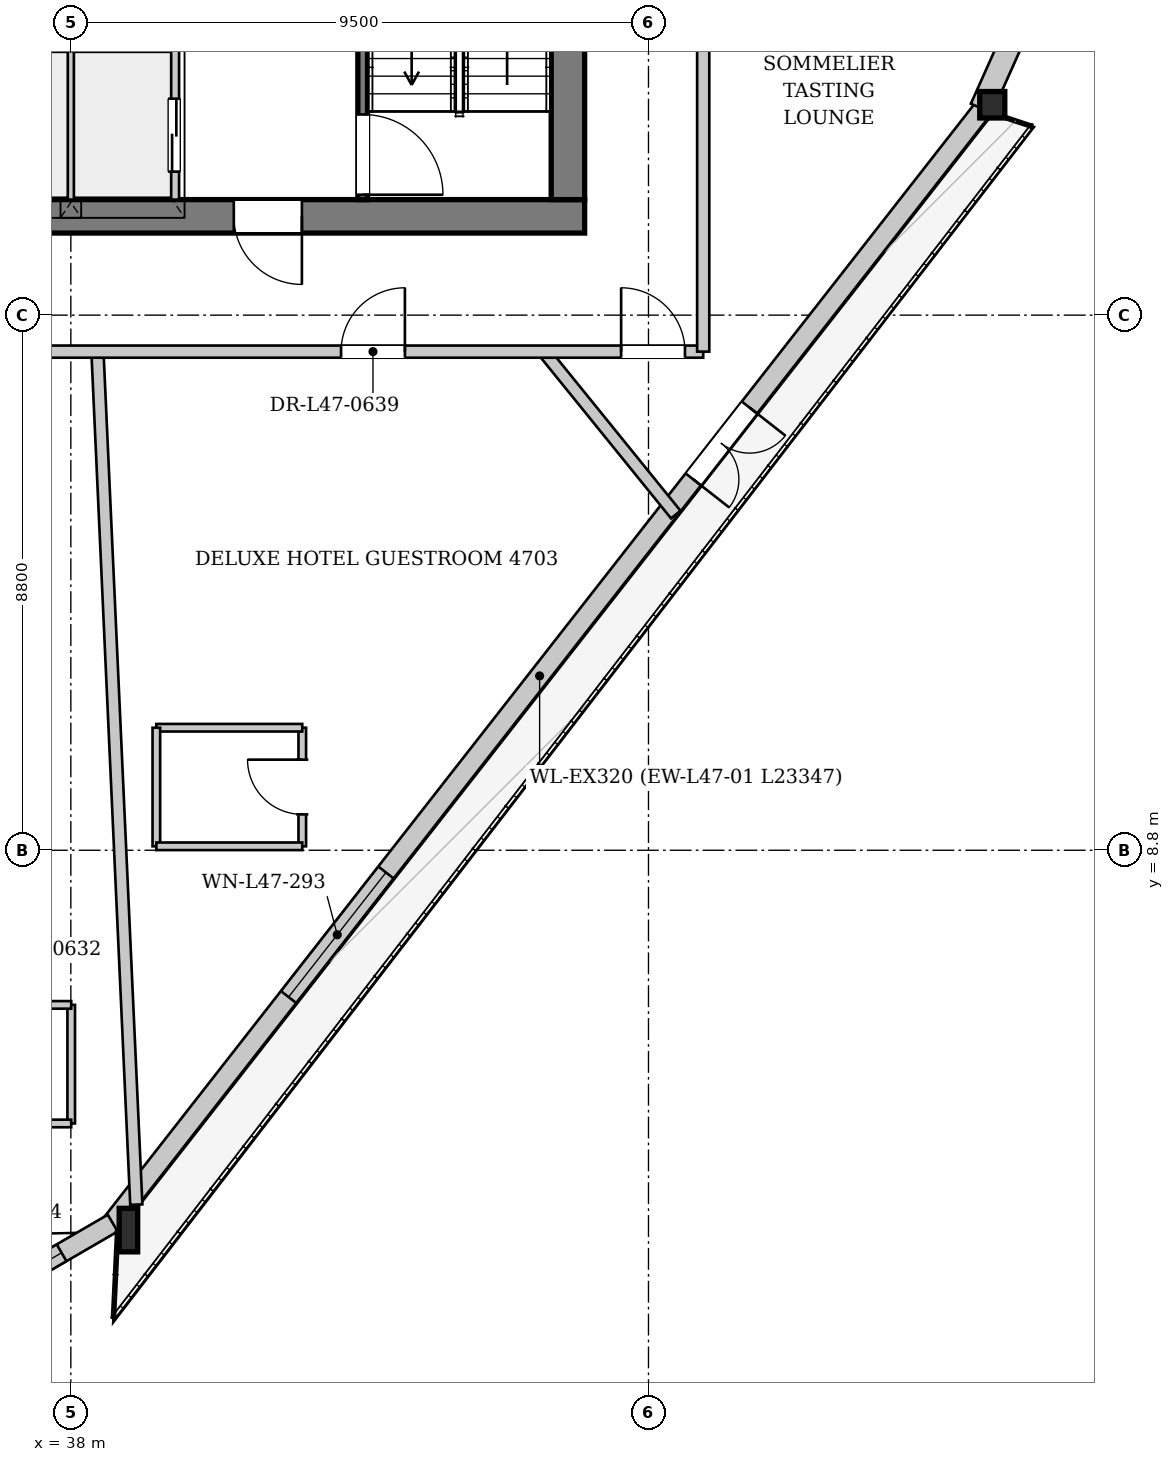
"""IFC4 building model, lengths in metres.
Left out: names, types, materials, properties, quantities, classifications, styles, units other than length and angle.
Written with IfcOpenShell. Run it as: python <this file> out.ifc"""

import sys

from ifc_helpers import new_model, si_unit, direction, frame, frame_2d, origin, origin_2d, place, context, subcontext, project, spatial, rectangle, i_section, extrude, source, transform, mapped, element, fill, save


model = new_model("IFC4")
c1 = context("Model", 3, precision=1e-05, world=origin(), true_north=direction((0.0, 1.0)))
c2 = subcontext(c1, "Body", "Model", "MODEL_VIEW")
j1 = project(units=[si_unit("LENGTHUNIT", "METRE"), si_unit("PLANEANGLEUNIT", "RADIAN")], contexts=[c1])
p1 = place(None, origin())
s1 = spatial("IfcSite", under=j1, at=p1, CompositionType="ELEMENT")
p2 = place(p1, origin())
s2 = spatial("IfcBuilding", under=s1, at=p2, CompositionType="ELEMENT")
p3 = place(p2, frame((0.0, 0.0, 178.55)))
s3 = spatial("IfcBuildingStorey", under=s2, at=p3, CompositionType="ELEMENT", Elevation=178.55)
m1 = source(origin(), c2, "Body", "SweptSolid", [
    extrude(i_section(OverallWidth=0.304, OverallDepth=0.716, WebThickness=0.021, FlangeThickness=0.04, at=origin_2d()), origin(), (0.0, 0.0, 1.0), 3.404),
])
p4 = place(p3, frame((38.769, 2.53, 0.0), z_axis=(0.104640945149, 0.013985595822, 0.994411723436), x_axis=(-0.132475210533, 0.991186318809, 0.0)))
e1 = element("IfcColumn", 1, at=p4, inside=s3, PredefinedType="COLUMN", context=c2, shape_type="MappedRepresentation", body=[
    mapped(m1, transform((0.0, 0.0, 0.0), x_axis=(1.0, 0.0, 0.0), y_axis=(0.0, 1.0, 0.0), z_axis=(0.0, 0.0, 1.0), scale=1.0)),
])
m2 = source(origin(), c2, "Body", "SweptSolid", [
    extrude(i_section(OverallWidth=0.412, OverallDepth=0.435, WebThickness=0.031, FlangeThickness=0.05, at=origin_2d()), origin(), (0.0, 0.0, 1.0), 3.396),
])
p5 = place(p3, frame((53.149, 20.923, 0.0), z_axis=(0.002803613193, 0.080873457504, 0.996720434036), x_axis=(-0.99939965217, 0.034645854609, 0.0)))
e2 = element("IfcColumn", 2, at=p5, inside=s3, PredefinedType="COLUMN", context=c2, shape_type="MappedRepresentation", body=[
    mapped(m2, transform((0.0, 0.0, 0.0), x_axis=(1.0, 0.0, 0.0), y_axis=(0.0, 1.0, 0.0), z_axis=(0.0, 0.0, 1.0), scale=1.0)),
])
p6 = place(p3, frame((53.023, 21.021, 0.0), z_axis=(0.0, 0.0, 1.0), x_axis=(-0.61594757216, -0.787787146601, 0.0)))
e3 = element("IfcWall", 3, at=p6, inside=s3, PredefinedType="SOLIDWALL", context=c2, shape_type="SweptSolid", body=[
    extrude(rectangle(XDim=23.347, YDim=0.32, at=frame_2d((11.674, 0.0))), origin(), (0.0, 0.0, 1.0), 2.722),
])
p7 = place(p6, frame((6.271, 0.0, 0.0)))
e4 = element("IfcOpeningElement", 4, at=p7, cuts=e3, PredefinedType="OPENING", context=c2, shape_type="SweptSolid", body=[
    extrude(rectangle(XDim=1.5, YDim=2.3, at=frame_2d((0.75, 1.15))), frame((0.0, 0.17, 0.0), z_axis=(0.0, -1.0, 0.0), x_axis=(1.0, 0.0, 0.0)), (0.0, 0.0, 1.0), 0.34),
])
p8 = place(p6, frame((15.977, 0.0, 0.252)))
e5 = element("IfcOpeningElement", 5, at=p8, cuts=e3, PredefinedType="OPENING", context=c2, shape_type="SweptSolid", body=[
    extrude(rectangle(XDim=2.6, YDim=2.35, at=frame_2d((1.3, 1.175))), frame((0.0, 0.17, 0.0), z_axis=(0.0, -1.0, 0.0), x_axis=(1.0, 0.0, 0.0)), (0.0, 0.0, 1.0), 0.34),
])
p9 = place(p3, frame((38.688, 2.668, 0.0), z_axis=(0.0, 0.0, 1.0), x_axis=(-0.864772067984, -0.502164585007, 0.0)))
e6 = element("IfcWall", 6, at=p9, inside=s3, PredefinedType="SOLIDWALL", context=c2, shape_type="SweptSolid", body=[
    extrude(rectangle(XDim=3.445, YDim=0.32, at=frame_2d((1.722, 0.0))), origin(), (0.0, 0.0, 1.0), 2.722),
])
p10 = place(p9, frame((0.972, 0.0, 0.302)))
e7 = element("IfcOpeningElement", 7, at=p10, cuts=e6, PredefinedType="OPENING", context=c2, shape_type="SweptSolid", body=[
    extrude(rectangle(XDim=1.5, YDim=2.3, at=frame_2d((0.75, 1.15))), frame((0.0, 0.17, 0.0), z_axis=(0.0, -1.0, 0.0), x_axis=(1.0, 0.0, 0.0)), (0.0, 0.0, 1.0), 0.34),
])
p11 = place(p3, frame((62.502, 42.315, 0.0), z_axis=(0.0, 0.0, 1.0), x_axis=(-0.408010166112, -0.912977384358, 0.0)))
e8 = element("IfcWall", 8, at=p11, inside=s3, PredefinedType="SOLIDWALL", context=c2, shape_type="SweptSolid", body=[
    extrude(rectangle(XDim=23.347, YDim=0.38, at=frame_2d((11.674, 0.0))), origin(), (0.0, 0.0, 1.0), 2.722),
])
p12 = place(p11, frame((4.337, 0.0, 0.352)))
e9 = element("IfcOpeningElement", 9, at=p12, cuts=e8, PredefinedType="OPENING", context=c2, shape_type="SweptSolid", body=[
    extrude(rectangle(XDim=2.2, YDim=2.25, at=frame_2d((1.1, 1.125))), frame((0.0, 0.2, 0.0), z_axis=(0.0, -1.0, 0.0), x_axis=(1.0, 0.0, 0.0)), (0.0, 0.0, 1.0), 0.4),
])
p13 = place(p11, frame((15.71, 0.0, 0.352)))
e10 = element("IfcOpeningElement", 10, at=p13, cuts=e8, PredefinedType="OPENING", context=c2, shape_type="SweptSolid", body=[
    extrude(rectangle(XDim=2.2, YDim=2.25, at=frame_2d((1.1, 1.125))), frame((0.0, 0.2, 0.0), z_axis=(0.0, -1.0, 0.0), x_axis=(1.0, 0.0, 0.0)), (0.0, 0.0, 1.0), 0.4),
])
p14 = place(p3, frame((46.45, 19.225, 0.0), z_axis=(0.0, 0.0, 1.0), x_axis=(-1.0, 0.0, 0.0)))
e11 = element("IfcWall", 11, at=p14, inside=s3, PredefinedType="SHEAR", context=c2, shape_type="SweptSolid", body=[
    extrude(rectangle(XDim=16.9, YDim=0.55, at=frame_2d((8.45, 0.0))), origin(), (0.0, 0.0, 1.0), 3.33),
])
p15 = place(p14, frame((4.65, 0.0, 0.0)))
e12 = element("IfcOpeningElement", 12, at=p15, cuts=e11, PredefinedType="OPENING", context=c2, shape_type="SweptSolid", body=[
    extrude(rectangle(XDim=1.12, YDim=2.25, at=frame_2d((0.56, 1.125))), frame((0.0, 0.285, 0.0), z_axis=(0.0, -1.0, 0.0), x_axis=(1.0, 0.0, 0.0)), (0.0, 0.0, 1.0), 0.57),
])
p16 = place(p14, frame((11.15, 0.0, 0.0)))
e13 = element("IfcOpeningElement", 13, at=p16, cuts=e11, PredefinedType="OPENING", context=c2, shape_type="SweptSolid", body=[
    extrude(rectangle(XDim=1.12, YDim=2.25, at=frame_2d((0.56, 1.125))), frame((0.0, 0.285, 0.0), z_axis=(0.0, -1.0, 0.0), x_axis=(1.0, 0.0, 0.0)), (0.0, 0.0, 1.0), 0.57),
])
p17 = place(p3, frame((46.175, 33.7, 0.0), z_axis=(0.0, 0.0, 1.0), x_axis=(0.0, -1.0, 0.0)))
e14 = element("IfcWall", 14, at=p17, inside=s3, PredefinedType="SHEAR", context=c2, shape_type="SweptSolid", body=[
    extrude(rectangle(XDim=14.2, YDim=0.55, at=frame_2d((7.1, 0.0))), origin(), (0.0, 0.0, 1.0), 3.33),
])
p18 = place(p17, frame((5.18, 0.0, 0.0)))
e15 = element("IfcOpeningElement", 15, at=p18, cuts=e14, PredefinedType="OPENING", context=c2, shape_type="SweptSolid", body=[
    extrude(rectangle(XDim=1.6, YDim=2.2, at=frame_2d((0.8, 1.1))), frame((0.0, 0.285, 0.0), z_axis=(0.0, -1.0, 0.0), x_axis=(1.0, 0.0, 0.0)), (0.0, 0.0, 1.0), 0.57),
])
p19 = place(p17, frame((2.05, 0.0, 0.0)))
e16 = element("IfcOpeningElement", 16, at=p19, cuts=e14, PredefinedType="OPENING", context=c2, shape_type="SweptSolid", body=[
    extrude(rectangle(XDim=0.95, YDim=2.1, at=frame_2d((0.475, 1.05))), frame((0.0, 0.285, 0.0), z_axis=(0.0, -1.0, 0.0), x_axis=(1.0, 0.0, 0.0)), (0.0, 0.0, 1.0), 0.57),
])
p20 = place(p3, frame((42.8, 26.96, 0.0), z_axis=(0.0, 0.0, 1.0), x_axis=(0.0, -1.0, 0.0)))
e17 = element("IfcWall", 17, at=p20, inside=s3, PredefinedType="PARTITIONING", context=c2, shape_type="SweptSolid", body=[
    extrude(rectangle(XDim=7.46, YDim=0.16, at=frame_2d((3.73, 0.0))), origin(), (0.0, 0.0, 1.0), 3.33),
])
p21 = place(p20, frame((6.06, 0.0, 0.0)))
e18 = element("IfcOpeningElement", 18, at=p21, cuts=e17, PredefinedType="OPENING", context=c2, shape_type="SweptSolid", body=[
    extrude(rectangle(XDim=1.32, YDim=2.2, at=frame_2d((0.66, 1.1))), frame((0.0, 0.09, 0.0), z_axis=(0.0, -1.0, 0.0), x_axis=(1.0, 0.0, 0.0)), (0.0, 0.0, 1.0), 0.18),
])
p22 = place(p3, frame((39.7, 24.28, 0.0), z_axis=(0.0, 0.0, 1.0), x_axis=(0.0, -1.0, 0.0)))
e19 = element("IfcWall", 19, at=p22, inside=s3, PredefinedType="PARTITIONING", context=c2, shape_type="SweptSolid", body=[
    extrude(rectangle(XDim=4.78, YDim=0.16, at=frame_2d((2.39, 0.0))), origin(), (0.0, 0.0, 1.0), 3.33),
])
p23 = place(p22, frame((3.12, 0.0, 0.0)))
e20 = element("IfcOpeningElement", 20, at=p23, cuts=e19, PredefinedType="OPENING", context=c2, shape_type="SweptSolid", body=[
    extrude(rectangle(XDim=1.2, YDim=2.2, at=frame_2d((0.6, 1.1))), frame((0.0, 0.09, 0.0), z_axis=(0.0, -1.0, 0.0), x_axis=(1.0, 0.0, 0.0)), (0.0, 0.0, 1.0), 0.18),
])
p24 = place(p3, frame((38.0, 19.5, 0.0), z_axis=(0.0, 0.0, 1.0), x_axis=(0.0, 1.0, 0.0)))
e21 = element("IfcWall", 21, at=p24, inside=s3, PredefinedType="PARTITIONING", context=c2, shape_type="SweptSolid", body=[
    extrude(rectangle(XDim=2.46, YDim=0.125, at=frame_2d((1.23, 0.0))), origin(), (0.0, 0.0, 1.0), 3.33),
])
p25 = place(p3, frame((38.438, 17.0, 0.0), z_axis=(0.0, 0.0, 1.0), x_axis=(0.045517283836, -0.998963551323, 0.0)))
e22 = element("IfcWall", 22, at=p25, inside=s3, PredefinedType="PARTITIONING", context=c2, shape_type="SweptSolid", body=[
    extrude(rectangle(XDim=14.042, YDim=0.2, at=frame_2d((7.021, 0.0))), origin(), (0.0, 0.0, 1.0), 3.005),
])
p26 = place(p3, frame((45.778, 17.0, 0.0), z_axis=(0.0, 0.0, 1.0), x_axis=(0.629534141466, -0.776972821101, 0.0)))
e23 = element("IfcWall", 23, at=p26, inside=s3, PredefinedType="PARTITIONING", context=c2, shape_type="SweptSolid", body=[
    extrude(rectangle(XDim=3.449, YDim=0.2, at=frame_2d((1.725, 0.0))), origin(), (0.0, 0.0, 1.0), 3.33),
])
p27 = place(p3, frame((38.006, 4.307, 0.0), z_axis=(0.0, 0.0, 1.0), x_axis=(0.0, 1.0, 0.0)))
e24 = element("IfcWall", 24, at=p27, inside=s3, PredefinedType="PARTITIONING", context=c2, shape_type="SweptSolid", body=[
    extrude(rectangle(XDim=1.95, YDim=0.125, at=frame_2d((0.975, 0.0))), origin(), (0.0, 0.0, 1.0), 3.33),
])
p28 = place(p3, frame((38.006, 6.257, 0.0), z_axis=(0.0, 0.0, 1.0), x_axis=(-1.0, 0.0, 0.0)))
e25 = element("IfcWall", 25, at=p28, inside=s3, PredefinedType="PARTITIONING", context=c2, shape_type="SweptSolid", body=[
    extrude(rectangle(XDim=2.4, YDim=0.125, at=frame_2d((1.2, 0.0))), origin(), (0.0, 0.0, 1.0), 3.33),
])
p29 = place(p28, frame((0.75, 0.0, 0.0)))
e26 = element("IfcOpeningElement", 26, at=p29, cuts=e25, PredefinedType="OPENING", context=c2, shape_type="SweptSolid", body=[
    extrude(rectangle(XDim=0.9, YDim=2.1, at=frame_2d((0.45, 1.05))), frame((0.0, 0.073, 0.0), z_axis=(0.0, -1.0, 0.0), x_axis=(1.0, 0.0, 0.0)), (0.0, 0.0, 1.0), 0.145),
])
p30 = place(p3, frame((35.606, 4.307, 0.0), z_axis=(0.0, 0.0, 1.0), x_axis=(1.0, 0.0, 0.0)))
e27 = element("IfcWall", 27, at=p30, inside=s3, PredefinedType="PARTITIONING", context=c2, shape_type="SweptSolid", body=[
    extrude(rectangle(XDim=2.4, YDim=0.125, at=frame_2d((1.2, 0.0))), origin(), (0.0, 0.0, 1.0), 3.33),
])
p31 = place(p3, frame((41.806, 8.865, 0.0), z_axis=(0.0, 0.0, 1.0), x_axis=(0.0, 1.0, 0.0)))
e28 = element("IfcWall", 28, at=p31, inside=s3, PredefinedType="PARTITIONING", context=c2, shape_type="SweptSolid", body=[
    extrude(rectangle(XDim=1.95, YDim=0.125, at=frame_2d((0.975, 0.0))), origin(), (0.0, 0.0, 1.0), 3.33),
])
p32 = place(p31, frame((0.525, 0.0, 0.0)))
e29 = element("IfcOpeningElement", 29, at=p32, cuts=e28, PredefinedType="OPENING", context=c2, shape_type="SweptSolid", body=[
    extrude(rectangle(XDim=0.9, YDim=2.1, at=frame_2d((0.45, 1.05))), frame((0.0, 0.073, 0.0), z_axis=(0.0, -1.0, 0.0), x_axis=(1.0, 0.0, 0.0)), (0.0, 0.0, 1.0), 0.145),
])
p33 = place(p3, frame((41.806, 10.815, 0.0), z_axis=(0.0, 0.0, 1.0), x_axis=(-1.0, 0.0, 0.0)))
e30 = element("IfcWall", 30, at=p33, inside=s3, PredefinedType="PARTITIONING", context=c2, shape_type="SweptSolid", body=[
    extrude(rectangle(XDim=2.4, YDim=0.125, at=frame_2d((1.2, 0.0))), origin(), (0.0, 0.0, 1.0), 3.33),
])
p34 = place(p3, frame((39.406, 10.815, 0.0), z_axis=(0.0, 0.0, 1.0), x_axis=(0.0, -1.0, 0.0)))
e31 = element("IfcWall", 31, at=p34, inside=s3, PredefinedType="PARTITIONING", context=c2, shape_type="SweptSolid", body=[
    extrude(rectangle(XDim=1.95, YDim=0.125, at=frame_2d((0.975, 0.0))), origin(), (0.0, 0.0, 1.0), 3.33),
])
p35 = place(p3, frame((39.406, 8.865, 0.0), z_axis=(0.0, 0.0, 1.0), x_axis=(1.0, 0.0, 0.0)))
e32 = element("IfcWall", 32, at=p35, inside=s3, PredefinedType="PARTITIONING", context=c2, shape_type="SweptSolid", body=[
    extrude(rectangle(XDim=2.4, YDim=0.125, at=frame_2d((1.2, 0.0))), origin(), (0.0, 0.0, 1.0), 3.33),
])
p36 = place(p3, frame((27.6, 17.0, 0.0), z_axis=(0.0, 0.0, 1.0), x_axis=(1.0, 0.0, 0.0)))
e33 = element("IfcWall", 33, at=p36, inside=s3, PredefinedType="PARTITIONING", context=c2, shape_type="SweptSolid", body=[
    extrude(rectangle(XDim=20.8, YDim=0.2, at=frame_2d((10.4, 0.0))), origin(), (0.0, 0.0, 1.0), 3.33),
])
p37 = place(p36, frame((5.92, 0.0, 0.0)))
e34 = element("IfcOpeningElement", 34, at=p37, cuts=e33, PredefinedType="OPENING", context=c2, shape_type="SweptSolid", body=[
    extrude(rectangle(XDim=1.05, YDim=2.2, at=frame_2d((0.525, 1.1))), frame((0.0, 0.11, 0.0), z_axis=(0.0, -1.0, 0.0), x_axis=(1.0, 0.0, 0.0)), (0.0, 0.0, 1.0), 0.22),
])
p38 = place(p36, frame((14.844, 0.0, 0.0)))
e35 = element("IfcOpeningElement", 35, at=p38, cuts=e33, PredefinedType="OPENING", context=c2, shape_type="SweptSolid", body=[
    extrude(rectangle(XDim=1.05, YDim=2.2, at=frame_2d((0.525, 1.1))), frame((0.0, 0.11, 0.0), z_axis=(0.0, -1.0, 0.0), x_axis=(1.0, 0.0, 0.0)), (0.0, 0.0, 1.0), 0.22),
])
p39 = place(p36, frame((19.45, 0.0, 0.0)))
e36 = element("IfcOpeningElement", 36, at=p39, cuts=e33, PredefinedType="OPENING", context=c2, shape_type="SweptSolid", body=[
    extrude(rectangle(XDim=1.05, YDim=2.2, at=frame_2d((0.525, 1.1))), frame((0.0, 0.11, 0.0), z_axis=(0.0, -1.0, 0.0), x_axis=(1.0, 0.0, 0.0)), (0.0, 0.0, 1.0), 0.22),
])
p40 = place(p3, frame((48.4, 17.0, 0.0), z_axis=(0.0, 0.0, 1.0), x_axis=(0.0, 1.0, 0.0)))
e37 = element("IfcWall", 37, at=p40, inside=s3, PredefinedType="PARTITIONING", context=c2, shape_type="SweptSolid", body=[
    extrude(rectangle(XDim=19.2, YDim=0.2, at=frame_2d((9.6, 0.0))), origin(), (0.0, 0.0, 1.0), 3.33),
])
p41 = place(p40, frame((9.249, 0.0, 0.0)))
e38 = element("IfcOpeningElement", 38, at=p41, cuts=e37, PredefinedType="OPENING", context=c2, shape_type="SweptSolid", body=[
    extrude(rectangle(XDim=1.05, YDim=2.2, at=frame_2d((0.525, 1.1))), frame((0.0, 0.11, 0.0), z_axis=(0.0, -1.0, 0.0), x_axis=(1.0, 0.0, 0.0)), (0.0, 0.0, 1.0), 0.22),
])
m3 = source(origin(), c2, "Body", "SweptSolid", [
    extrude(rectangle(XDim=1.5, YDim=2.3, at=frame_2d((0.75, 1.15))), frame((0.0, 0.025, 0.0), z_axis=(0.0, -1.0, 0.0), x_axis=(1.0, 0.0, 0.0)), (0.0, 0.0, 1.0), 0.05),
])
p42 = place(p7, origin())
e39 = element("IfcDoor", 39, at=p42, inside=s3, OperationType="DOUBLE_DOOR_SINGLE_SWING", PredefinedType="DOOR", context=c2, shape_type="MappedRepresentation", body=[
    mapped(m3, transform((0.0, 0.0, 0.0), x_axis=(1.0, 0.0, 0.0), y_axis=(0.0, 1.0, 0.0), z_axis=(0.0, 0.0, 1.0), scale=1.0)),
])
fill(e4, e39)
m4 = source(origin(), c2, "Body", "SweptSolid", [
    extrude(rectangle(XDim=2.6, YDim=2.35, at=frame_2d((1.3, 1.175))), frame((0.0, 0.03, 0.0), z_axis=(0.0, -1.0, 0.0), x_axis=(1.0, 0.0, 0.0)), (0.0, 0.0, 1.0), 0.06),
])
p43 = place(p8, origin())
e40 = element("IfcWindow", 40, at=p43, inside=s3, PartitioningType="SINGLE_PANEL", PredefinedType="WINDOW", context=c2, shape_type="MappedRepresentation", body=[
    mapped(m4, transform((0.0, 0.0, 0.0), x_axis=(1.0, 0.0, 0.0), y_axis=(0.0, 1.0, 0.0), z_axis=(0.0, 0.0, 1.0), scale=1.0)),
])
fill(e5, e40)
m5 = source(origin(), c2, "Body", "SweptSolid", [
    extrude(rectangle(XDim=1.5, YDim=2.3, at=frame_2d((0.75, 1.15))), frame((0.0, 0.03, 0.0), z_axis=(0.0, -1.0, 0.0), x_axis=(1.0, 0.0, 0.0)), (0.0, 0.0, 1.0), 0.06),
])
p44 = place(p10, origin())
e41 = element("IfcWindow", 41, at=p44, inside=s3, PartitioningType="SINGLE_PANEL", PredefinedType="WINDOW", context=c2, shape_type="MappedRepresentation", body=[
    mapped(m5, transform((0.0, 0.0, 0.0), x_axis=(1.0, 0.0, 0.0), y_axis=(0.0, 1.0, 0.0), z_axis=(0.0, 0.0, 1.0), scale=1.0)),
])
fill(e7, e41)
m6 = source(origin(), c2, "Body", "SweptSolid", [
    extrude(rectangle(XDim=1.12, YDim=2.25, at=frame_2d((0.56, 1.125))), frame((0.0, 0.025, 0.0), z_axis=(0.0, -1.0, 0.0), x_axis=(1.0, 0.0, 0.0)), (0.0, 0.0, 1.0), 0.05),
])
p45 = place(p15, origin())
e42 = element("IfcDoor", 42, at=p45, inside=s3, OperationType="SINGLE_SWING_LEFT", PredefinedType="DOOR", context=c2, shape_type="MappedRepresentation", body=[
    mapped(m6, transform((0.0, 0.0, 0.0), x_axis=(1.0, 0.0, 0.0), y_axis=(0.0, 1.0, 0.0), z_axis=(0.0, 0.0, 1.0), scale=1.0)),
])
fill(e12, e42)
m7 = source(origin(), c2, "Body", "SweptSolid", [
    extrude(rectangle(XDim=1.32, YDim=2.2, at=frame_2d((0.66, 1.1))), frame((0.0, 0.025, 0.0), z_axis=(0.0, -1.0, 0.0), x_axis=(1.0, 0.0, 0.0)), (0.0, 0.0, 1.0), 0.05),
])
p46 = place(p21, origin())
e43 = element("IfcDoor", 43, at=p46, inside=s3, OperationType="SINGLE_SWING_RIGHT", PredefinedType="DOOR", context=c2, shape_type="MappedRepresentation", body=[
    mapped(m7, transform((0.0, 0.0, 0.0), x_axis=(1.0, 0.0, 0.0), y_axis=(0.0, 1.0, 0.0), z_axis=(0.0, 0.0, 1.0), scale=1.0)),
])
fill(e18, e43)
m8 = source(origin(), c2, "Body", "SweptSolid", [
    extrude(rectangle(XDim=1.2, YDim=2.2, at=frame_2d((0.6, 1.1))), frame((0.0, 0.025, 0.0), z_axis=(0.0, -1.0, 0.0), x_axis=(1.0, 0.0, 0.0)), (0.0, 0.0, 1.0), 0.05),
])
p47 = place(p23, origin())
e44 = element("IfcDoor", 44, at=p47, inside=s3, OperationType="DOUBLE_DOOR_SLIDING", PredefinedType="DOOR", context=c2, shape_type="MappedRepresentation", body=[
    mapped(m8, transform((0.0, 0.0, 0.0), x_axis=(1.0, 0.0, 0.0), y_axis=(0.0, 1.0, 0.0), z_axis=(0.0, 0.0, 1.0), scale=1.0)),
])
fill(e20, e44)
m9 = source(origin(), c2, "Body", "SweptSolid", [
    extrude(rectangle(XDim=0.9, YDim=2.1, at=frame_2d((0.45, 1.05))), frame((0.0, 0.025, 0.0), z_axis=(0.0, -1.0, 0.0), x_axis=(1.0, 0.0, 0.0)), (0.0, 0.0, 1.0), 0.05),
])
p48 = place(p32, origin())
e45 = element("IfcDoor", 45, at=p48, inside=s3, OperationType="SINGLE_SWING_RIGHT", PredefinedType="DOOR", context=c2, shape_type="MappedRepresentation", body=[
    mapped(m9, transform((0.0, 0.0, 0.0), x_axis=(1.0, 0.0, 0.0), y_axis=(0.0, 1.0, 0.0), z_axis=(0.0, 0.0, 1.0), scale=1.0)),
])
fill(e29, e45)
m10 = source(origin(), c2, "Body", "SweptSolid", [
    extrude(rectangle(XDim=1.05, YDim=2.2, at=frame_2d((0.525, 1.1))), frame((0.0, 0.025, 0.0), z_axis=(0.0, -1.0, 0.0), x_axis=(1.0, 0.0, 0.0)), (0.0, 0.0, 1.0), 0.05),
])
p49 = place(p38, origin())
e46 = element("IfcDoor", 46, at=p49, inside=s3, OperationType="SINGLE_SWING_RIGHT", PredefinedType="DOOR", context=c2, shape_type="MappedRepresentation", body=[
    mapped(m10, transform((0.0, 0.0, 0.0), x_axis=(1.0, 0.0, 0.0), y_axis=(0.0, 1.0, 0.0), z_axis=(0.0, 0.0, 1.0), scale=1.0)),
])
fill(e35, e46)
p50 = place(p39, origin())
e47 = element("IfcDoor", 47, at=p50, inside=s3, OperationType="SINGLE_SWING_LEFT", PredefinedType="DOOR", context=c2, shape_type="MappedRepresentation", body=[
    mapped(m10, transform((0.0, 0.0, 0.0), x_axis=(1.0, 0.0, 0.0), y_axis=(0.0, 1.0, 0.0), z_axis=(0.0, 0.0, 1.0), scale=1.0)),
])
fill(e36, e47)
save(model, sys.argv[1])
